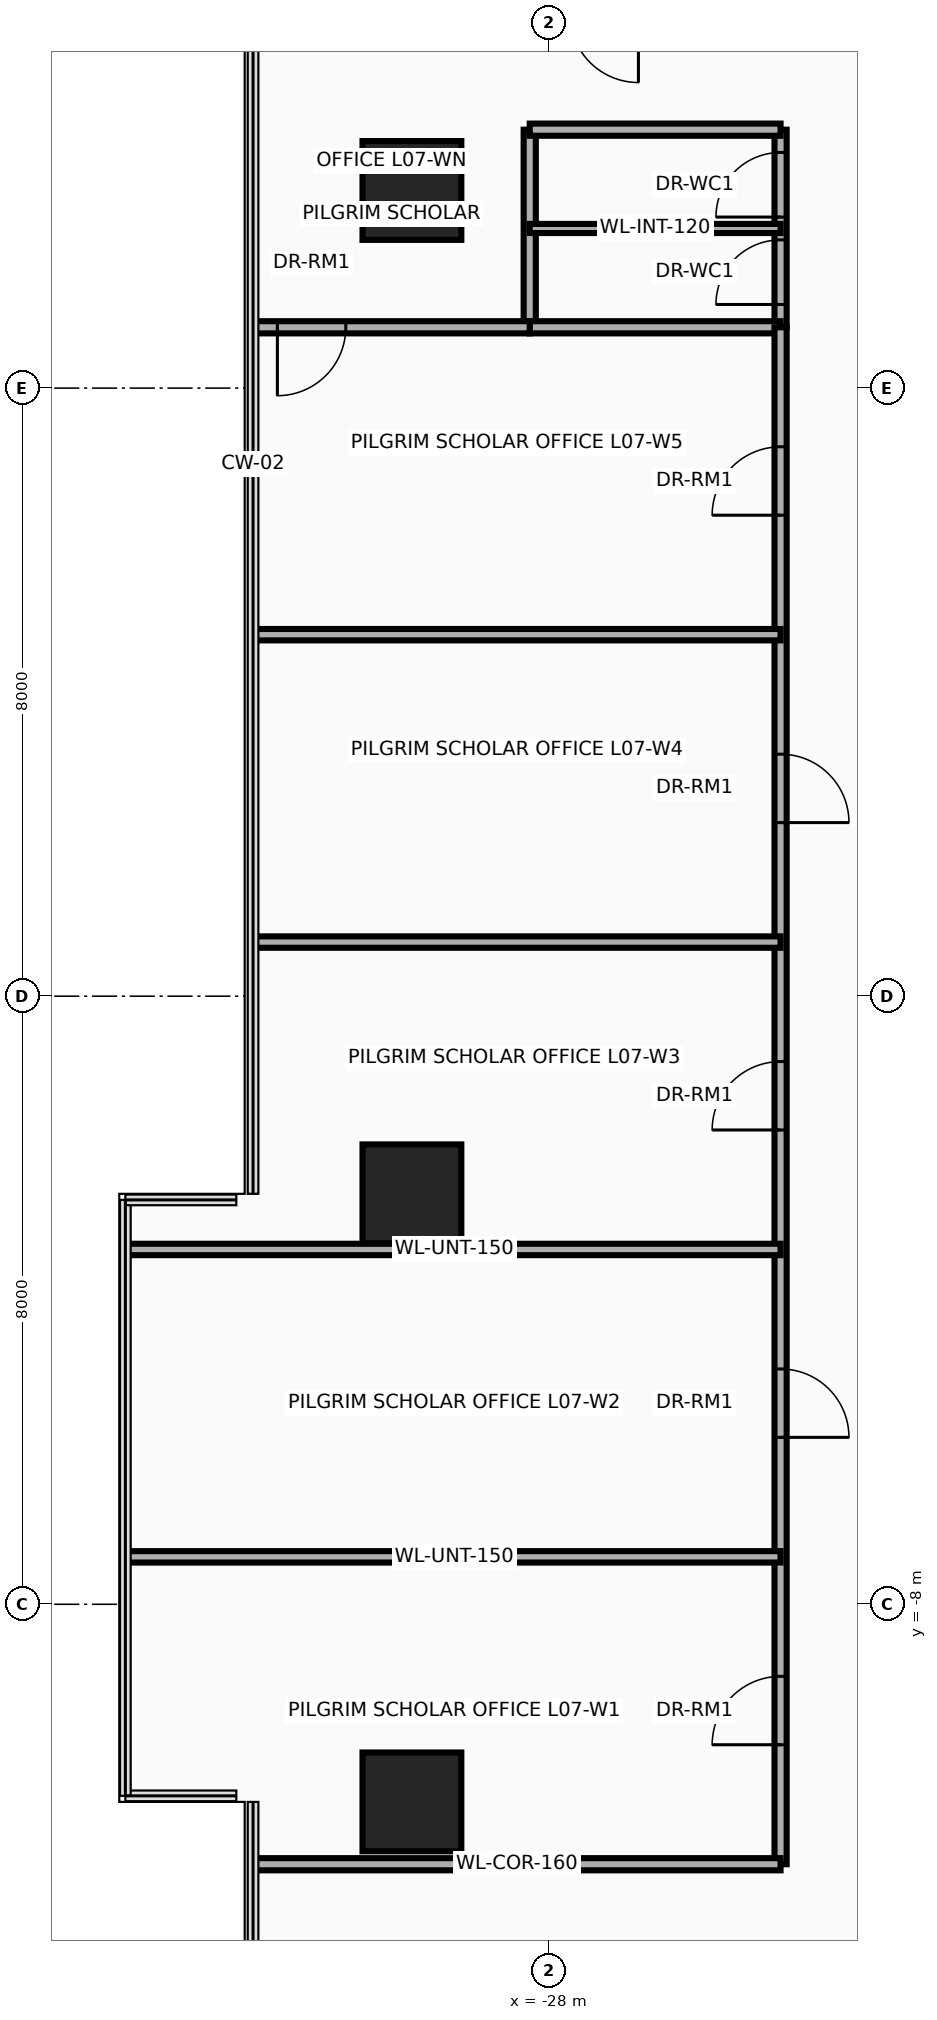
"""IFC4 building model, lengths in metres.
Left out: names, types, materials, properties, quantities, classifications, styles, units other than length and angle.
Written with IfcOpenShell. Run it as: python <this file> out.ifc"""

import sys

from ifc_helpers import new_model, si_unit, direction, frame, frame_2d, origin, origin_2d, place, context, subcontext, project, spatial, rectangle, circle, extrude, source, transform, mapped, element, fill, save


model = new_model("IFC4")
c1 = context("Model", 3, precision=1e-05, world=origin(), true_north=direction((0.0, 1.0)))
c2 = subcontext(c1, "Body", "Model", "MODEL_VIEW")
j1 = project(units=[si_unit("LENGTHUNIT", "METRE"), si_unit("PLANEANGLEUNIT", "RADIAN")], contexts=[c1])
p1 = place(None, origin())
s1 = spatial("IfcSite", under=j1, at=p1, CompositionType="ELEMENT")
p2 = place(p1, origin())
s2 = spatial("IfcBuilding", under=s1, at=p2, CompositionType="ELEMENT")
p3 = place(p2, frame((0.0, 0.0, 33.4)))
s3 = spatial("IfcBuildingStorey", under=s2, at=p3, CompositionType="ELEMENT", Elevation=33.4)
m1 = source(origin(), c2, "Body", "SweptSolid", [
    extrude(circle(Radius=0.65, at=origin_2d()), origin(), (0.0, 0.0, 1.0), 3.7),
])
for number, where, z_axis, x_axis in (
    (1, (-29.8, -10.6, 0.0), (0.0, 0.0, 1.0), (1.0, 0.0, 0.0)),
    (2, (-29.8, -2.6, 0.0), (0.0, 0.0, 1.0), (1.0, 0.0, 0.0)),
    (3, (-29.8, 10.6, 0.0), (0.0, 0.0, 1.0), (1.0, 0.0, 0.0)),
):
    element("IfcColumn", number, at=place(p3, frame(where, z_axis=z_axis, x_axis=x_axis)), inside=s3, PredefinedType="COLUMN", context=c2, shape_type="MappedRepresentation", body=[
        mapped(m1, transform((0.0, 0.0, 0.0), x_axis=(1.0, 0.0, 0.0), y_axis=(0.0, 1.0, 0.0), z_axis=(0.0, 0.0, 1.0), scale=1.0)),
    ])
p4 = place(p3, frame((-28.25, 8.8, 0.0), z_axis=(0.0, 0.0, 1.0), x_axis=(0.0, 1.0, 0.0)))
e4 = element("IfcWall", 4, at=p4, inside=s3, PredefinedType="PARTITIONING", context=c2, shape_type="SweptSolid", body=[
    extrude(rectangle(XDim=2.6, YDim=0.16, at=frame_2d((1.3, 0.0))), origin(), (0.0, 0.0, 1.0), 2.583),
])
p5 = place(p3, frame((-24.95, 8.8, 0.0), z_axis=(0.0, 0.0, 1.0), x_axis=(0.0, 1.0, 0.0)))
e5 = element("IfcWall", 5, at=p5, inside=s3, PredefinedType="PARTITIONING", context=c2, shape_type="SweptSolid", body=[
    extrude(rectangle(XDim=2.6, YDim=0.16, at=frame_2d((1.3, 0.0))), origin(), (0.0, 0.0, 1.0), 2.583),
])
p6 = place(p5, frame((0.3, 0.0, 0.0)))
e6 = element("IfcOpeningElement", 6, at=p6, cuts=e5, PredefinedType="OPENING", context=c2, shape_type="SweptSolid", body=[
    extrude(rectangle(XDim=0.85, YDim=2.1, at=frame_2d((0.425, 1.05))), frame((0.0, 0.095, 0.0), z_axis=(0.0, -1.0, 0.0), x_axis=(1.0, 0.0, 0.0)), (0.0, 0.0, 1.0), 0.19),
])
p7 = place(p5, frame((1.45, 0.0, 0.0)))
e7 = element("IfcOpeningElement", 7, at=p7, cuts=e5, PredefinedType="OPENING", context=c2, shape_type="SweptSolid", body=[
    extrude(rectangle(XDim=0.85, YDim=2.1, at=frame_2d((0.425, 1.05))), frame((0.0, 0.095, 0.0), z_axis=(0.0, -1.0, 0.0), x_axis=(1.0, 0.0, 0.0)), (0.0, 0.0, 1.0), 0.19),
])
for number, where, z_axis, x_axis in (
    (8, (-28.25, 8.8, 0.0), (0.0, 0.0, 1.0), (1.0, 0.0, 0.0)),
    (9, (-28.25, 11.4, 0.0), (0.0, 0.0, 1.0), (1.0, 0.0, 0.0)),
):
    element("IfcWall", number, at=place(p3, frame(where, z_axis=z_axis, x_axis=x_axis)), inside=s3, PredefinedType="PARTITIONING", context=c2, shape_type="SweptSolid", body=[
        extrude(rectangle(XDim=3.3, YDim=0.16, at=frame_2d((1.65, 0.0))), origin(), (0.0, 0.0, 1.0), 3.46),
    ])
p8 = place(p3, frame((-28.25, 10.1, 0.0), z_axis=(0.0, 0.0, 1.0), x_axis=(1.0, 0.0, 0.0)))
e10 = element("IfcWall", 10, at=p8, inside=s3, PredefinedType="PARTITIONING", context=c2, shape_type="SweptSolid", body=[
    extrude(rectangle(XDim=3.3, YDim=0.12, at=frame_2d((1.65, 0.0))), origin(), (0.0, 0.0, 1.0), 3.46),
])
p9 = place(p3, frame((-24.95, -11.42, 0.0), z_axis=(0.0, 0.0, 1.0), x_axis=(0.0, 1.0, 0.0)))
e11 = element("IfcWall", 11, at=p9, inside=s3, PredefinedType="PARTITIONING", context=c2, shape_type="SweptSolid", body=[
    extrude(rectangle(XDim=20.22, YDim=0.16, at=frame_2d((10.11, 0.0))), origin(), (0.0, 0.0, 1.0), 2.583),
])
p10 = place(p9, frame((1.572, 0.0, 0.0)))
e12 = element("IfcOpeningElement", 12, at=p10, cuts=e11, PredefinedType="OPENING", context=c2, shape_type="SweptSolid", body=[
    extrude(rectangle(XDim=0.9, YDim=2.1, at=frame_2d((0.45, 1.05))), frame((0.0, 0.095, 0.0), z_axis=(0.0, -1.0, 0.0), x_axis=(1.0, 0.0, 0.0)), (0.0, 0.0, 1.0), 0.19),
])
p11 = place(p9, frame((5.616, 0.0, 0.0)))
e13 = element("IfcOpeningElement", 13, at=p11, cuts=e11, PredefinedType="OPENING", context=c2, shape_type="SweptSolid", body=[
    extrude(rectangle(XDim=0.9, YDim=2.1, at=frame_2d((0.45, 1.05))), frame((0.0, 0.095, 0.0), z_axis=(0.0, -1.0, 0.0), x_axis=(1.0, 0.0, 0.0)), (0.0, 0.0, 1.0), 0.19),
])
p12 = place(p9, frame((9.66, 0.0, 0.0)))
e14 = element("IfcOpeningElement", 14, at=p12, cuts=e11, PredefinedType="OPENING", context=c2, shape_type="SweptSolid", body=[
    extrude(rectangle(XDim=0.9, YDim=2.1, at=frame_2d((0.45, 1.05))), frame((0.0, 0.095, 0.0), z_axis=(0.0, -1.0, 0.0), x_axis=(1.0, 0.0, 0.0)), (0.0, 0.0, 1.0), 0.19),
])
p13 = place(p9, frame((13.704, 0.0, 0.0)))
e15 = element("IfcOpeningElement", 15, at=p13, cuts=e11, PredefinedType="OPENING", context=c2, shape_type="SweptSolid", body=[
    extrude(rectangle(XDim=0.9, YDim=2.1, at=frame_2d((0.45, 1.05))), frame((0.0, 0.095, 0.0), z_axis=(0.0, -1.0, 0.0), x_axis=(1.0, 0.0, 0.0)), (0.0, 0.0, 1.0), 0.19),
])
p14 = place(p9, frame((17.748, 0.0, 0.0)))
e16 = element("IfcOpeningElement", 16, at=p14, cuts=e11, PredefinedType="OPENING", context=c2, shape_type="SweptSolid", body=[
    extrude(rectangle(XDim=0.9, YDim=2.1, at=frame_2d((0.45, 1.05))), frame((0.0, 0.095, 0.0), z_axis=(0.0, -1.0, 0.0), x_axis=(1.0, 0.0, 0.0)), (0.0, 0.0, 1.0), 0.19),
])
p15 = place(p3, frame((-31.89, 8.8, 0.0), z_axis=(0.0, 0.0, 1.0), x_axis=(1.0, 0.0, 0.0)))
e17 = element("IfcWall", 17, at=p15, inside=s3, PredefinedType="PARTITIONING", context=c2, shape_type="SweptSolid", body=[
    extrude(rectangle(XDim=3.64, YDim=0.16, at=frame_2d((1.82, 0.0))), origin(), (0.0, 0.0, 1.0), 2.896),
])
p16 = place(p15, frame((0.32, 0.0, 0.0)))
e18 = element("IfcOpeningElement", 18, at=p16, cuts=e17, PredefinedType="OPENING", context=c2, shape_type="SweptSolid", body=[
    extrude(rectangle(XDim=0.9, YDim=2.1, at=frame_2d((0.45, 1.05))), frame((0.0, 0.095, 0.0), z_axis=(0.0, -1.0, 0.0), x_axis=(1.0, 0.0, 0.0)), (0.0, 0.0, 1.0), 0.19),
])
for number, where, z_axis, x_axis in (
    (19, (-33.54, -7.376, 0.0), (0.0, 0.0, 1.0), (1.0, 0.0, 0.0)),
    (20, (-33.54, -3.332, 0.0), (0.0, 0.0, 1.0), (1.0, 0.0, 0.0)),
):
    element("IfcWall", number, at=place(p3, frame(where, z_axis=z_axis, x_axis=x_axis)), inside=s3, PredefinedType="PARTITIONING", context=c2, shape_type="SweptSolid", body=[
        extrude(rectangle(XDim=8.59, YDim=0.15, at=frame_2d((4.295, 0.0))), origin(), (0.0, 0.0, 1.0), 2.896),
    ])
for number, where, z_axis, x_axis in (
    (21, (-31.89, 0.712, 0.0), (0.0, 0.0, 1.0), (1.0, 0.0, 0.0)),
    (22, (-31.89, 4.756, 0.0), (0.0, 0.0, 1.0), (1.0, 0.0, 0.0)),
):
    element("IfcWall", number, at=place(p3, frame(where, z_axis=z_axis, x_axis=x_axis)), inside=s3, PredefinedType="PARTITIONING", context=c2, shape_type="SweptSolid", body=[
        extrude(rectangle(XDim=6.94, YDim=0.15, at=frame_2d((3.47, 0.0))), origin(), (0.0, 0.0, 1.0), 2.896),
    ])
p17 = place(p3, frame((-31.89, -11.42, 0.0), z_axis=(0.0, 0.0, 1.0), x_axis=(1.0, 0.0, 0.0)))
e23 = element("IfcWall", 23, at=p17, inside=s3, PredefinedType="PARTITIONING", context=c2, shape_type="SweptSolid", body=[
    extrude(rectangle(XDim=6.94, YDim=0.16, at=frame_2d((3.47, 0.0))), origin(), (0.0, 0.0, 1.0), 3.46),
])
p18 = place(p6, origin())
e24 = element("IfcDoor", 24, at=p18, inside=s3, OperationType="SINGLE_SWING_LEFT", PredefinedType="DOOR", context=c2, shape_type="SweptSolid", body=[
    extrude(rectangle(XDim=0.85, YDim=2.1, at=frame_2d((0.425, 1.05))), frame((0.0, 0.025, 0.0), z_axis=(0.0, -1.0, 0.0), x_axis=(1.0, 0.0, 0.0)), (0.0, 0.0, 1.0), 0.05),
])
fill(e6, e24)
p19 = place(p7, origin())
e25 = element("IfcDoor", 25, at=p19, inside=s3, OperationType="SINGLE_SWING_RIGHT", PredefinedType="DOOR", context=c2, shape_type="SweptSolid", body=[
    extrude(rectangle(XDim=0.85, YDim=2.1, at=frame_2d((0.425, 1.05))), frame((0.0, 0.025, 0.0), z_axis=(0.0, -1.0, 0.0), x_axis=(1.0, 0.0, 0.0)), (0.0, 0.0, 1.0), 0.05),
])
fill(e7, e25)
p20 = place(p16, frame((0.9, 0.0, 0.0), z_axis=(0.0, 0.0, 1.0), x_axis=(-1.0, 0.0, 0.0)))
e26 = element("IfcDoor", 26, at=p20, inside=s3, OperationType="SINGLE_SWING_LEFT", PredefinedType="DOOR", context=c2, shape_type="SweptSolid", body=[
    extrude(rectangle(XDim=0.9, YDim=2.1, at=frame_2d((0.45, 1.05))), frame((0.0, 0.025, 0.0), z_axis=(0.0, -1.0, 0.0), x_axis=(1.0, 0.0, 0.0)), (0.0, 0.0, 1.0), 0.05),
])
fill(e18, e26)
p21 = place(p10, origin())
e27 = element("IfcDoor", 27, at=p21, inside=s3, OperationType="SINGLE_SWING_RIGHT", PredefinedType="DOOR", context=c2, shape_type="SweptSolid", body=[
    extrude(rectangle(XDim=0.9, YDim=2.1, at=frame_2d((0.45, 1.05))), frame((0.0, 0.025, 0.0), z_axis=(0.0, -1.0, 0.0), x_axis=(1.0, 0.0, 0.0)), (0.0, 0.0, 1.0), 0.05),
])
fill(e12, e27)
p22 = place(p11, frame((0.9, 0.0, 0.0), z_axis=(0.0, 0.0, 1.0), x_axis=(-1.0, 0.0, 0.0)))
e28 = element("IfcDoor", 28, at=p22, inside=s3, OperationType="SINGLE_SWING_LEFT", PredefinedType="DOOR", context=c2, shape_type="SweptSolid", body=[
    extrude(rectangle(XDim=0.9, YDim=2.1, at=frame_2d((0.45, 1.05))), frame((0.0, 0.025, 0.0), z_axis=(0.0, -1.0, 0.0), x_axis=(1.0, 0.0, 0.0)), (0.0, 0.0, 1.0), 0.05),
])
fill(e13, e28)
p23 = place(p12, origin())
e29 = element("IfcDoor", 29, at=p23, inside=s3, OperationType="SINGLE_SWING_RIGHT", PredefinedType="DOOR", context=c2, shape_type="SweptSolid", body=[
    extrude(rectangle(XDim=0.9, YDim=2.1, at=frame_2d((0.45, 1.05))), frame((0.0, 0.025, 0.0), z_axis=(0.0, -1.0, 0.0), x_axis=(1.0, 0.0, 0.0)), (0.0, 0.0, 1.0), 0.05),
])
fill(e14, e29)
p24 = place(p13, frame((0.9, 0.0, 0.0), z_axis=(0.0, 0.0, 1.0), x_axis=(-1.0, 0.0, 0.0)))
e30 = element("IfcDoor", 30, at=p24, inside=s3, OperationType="SINGLE_SWING_LEFT", PredefinedType="DOOR", context=c2, shape_type="SweptSolid", body=[
    extrude(rectangle(XDim=0.9, YDim=2.1, at=frame_2d((0.45, 1.05))), frame((0.0, 0.025, 0.0), z_axis=(0.0, -1.0, 0.0), x_axis=(1.0, 0.0, 0.0)), (0.0, 0.0, 1.0), 0.05),
])
fill(e15, e30)
p25 = place(p14, origin())
e31 = element("IfcDoor", 31, at=p25, inside=s3, OperationType="SINGLE_SWING_RIGHT", PredefinedType="DOOR", context=c2, shape_type="SweptSolid", body=[
    extrude(rectangle(XDim=0.9, YDim=2.1, at=frame_2d((0.45, 1.05))), frame((0.0, 0.025, 0.0), z_axis=(0.0, -1.0, 0.0), x_axis=(1.0, 0.0, 0.0)), (0.0, 0.0, 1.0), 0.05),
])
fill(e16, e31)
save(model, sys.argv[1])
